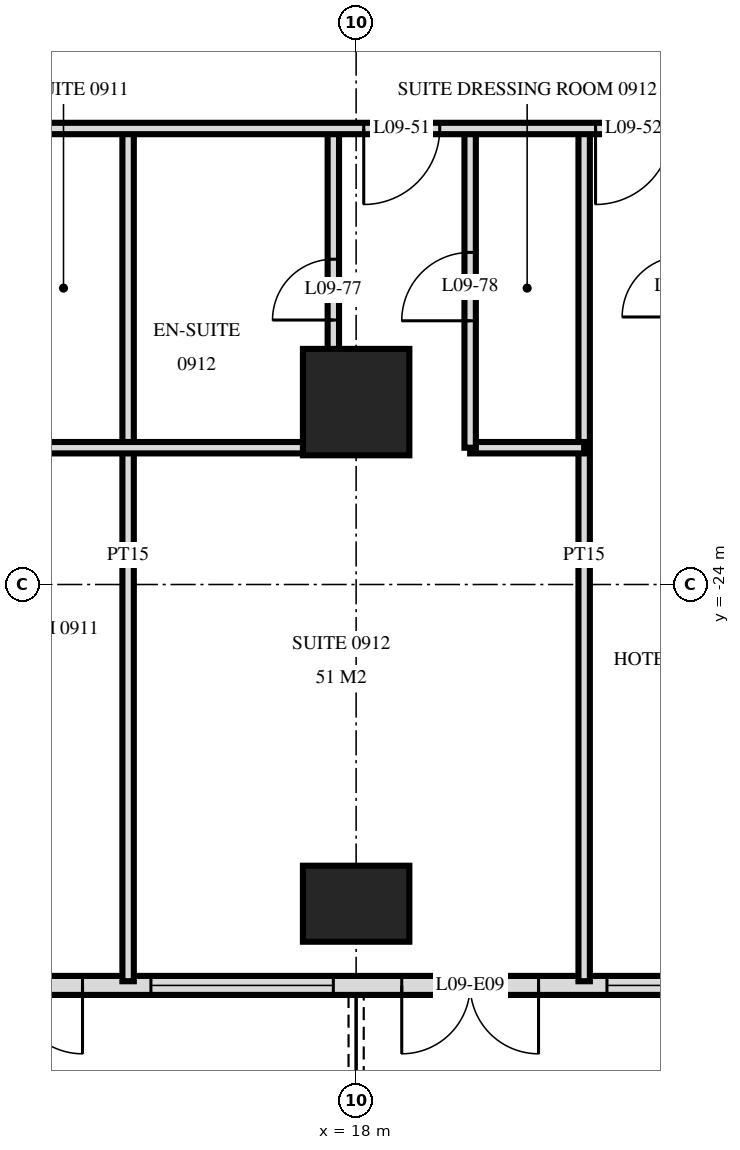
"""IFC4 building model, lengths in metres.
Left out: names, types, materials, properties, quantities, classifications, styles, units other than length and angle.
Written with IfcOpenShell. Run it as: python <this file> out.ifc"""

import sys

from ifc_helpers import new_model, si_unit, direction, frame, frame_2d, origin, origin_2d, place, context, subcontext, project, spatial, rectangle, extrude, element, fill, save


model = new_model("IFC4")
c1 = context("Model", 3, precision=1e-05, world=origin(), true_north=direction((0.0, 1.0)))
c2 = subcontext(c1, "Body", "Model", "MODEL_VIEW")
j1 = project(units=[si_unit("LENGTHUNIT", "METRE"), si_unit("PLANEANGLEUNIT", "RADIAN")], contexts=[c1])
p1 = place(None, origin())
s1 = spatial("IfcSite", under=j1, at=p1, CompositionType="ELEMENT")
p2 = place(p1, origin())
s2 = spatial("IfcBuilding", under=s1, at=p2, CompositionType="ELEMENT")
p3 = place(p2, frame((0.0, 0.0, 42.0)))
s3 = spatial("IfcBuildingStorey", under=s2, at=p3, CompositionType="ELEMENT", Elevation=42.0)
p4 = place(p3, frame((18.0, -28.2, 0.0), z_axis=(0.0, 0.0, 1.0), x_axis=(1.0, 0.0, 0.0)))
e1 = element("IfcColumn", 1, at=p4, inside=s3, PredefinedType="COLUMN", context=c2, shape_type="SweptSolid", body=[
    extrude(rectangle(XDim=1.4, YDim=1.0, at=origin_2d()), origin(), (0.0, 0.0, 1.0), 3.6),
])
p5 = place(p3, frame((18.0, -21.6, 0.0), z_axis=(0.0, 0.0, 1.0), x_axis=(1.0, 0.0, 0.0)))
e2 = element("IfcColumn", 2, at=p5, inside=s3, PredefinedType="COLUMN", context=c2, shape_type="SweptSolid", body=[
    extrude(rectangle(XDim=1.4, YDim=1.4, at=origin_2d()), origin(), (0.0, 0.0, 1.0), 3.6),
])
p6 = place(p3, frame((-28.775, -29.275, 0.0), z_axis=(0.0, 0.0, 1.0), x_axis=(1.0, 0.0, 0.0)))
e3 = element("IfcWall", 3, at=p6, inside=s3, PredefinedType="SOLIDWALL", context=c2, shape_type="SweptSolid", body=[
    extrude(rectangle(XDim=57.551, YDim=0.25, at=frame_2d((28.775, 0.0))), origin(), (0.0, 0.0, 1.0), 3.32),
])
p7 = place(p6, frame((0.575, 0.0, 0.0)))
e4 = element("IfcOpeningElement", 4, at=p7, cuts=e3, PredefinedType="OPENING", context=c2, shape_type="SweptSolid", body=[
    extrude(rectangle(XDim=1.8, YDim=2.4, at=frame_2d((0.9, 1.2))), frame((0.0, 0.135, 0.0), z_axis=(0.0, -1.0, 0.0), x_axis=(1.0, 0.0, 0.0)), (0.0, 0.0, 1.0), 0.27),
])
p8 = place(p6, frame((5.375, 0.0, 0.0)))
e5 = element("IfcOpeningElement", 5, at=p8, cuts=e3, PredefinedType="OPENING", context=c2, shape_type="SweptSolid", body=[
    extrude(rectangle(XDim=1.8, YDim=2.4, at=frame_2d((0.9, 1.2))), frame((0.0, 0.135, 0.0), z_axis=(0.0, -1.0, 0.0), x_axis=(1.0, 0.0, 0.0)), (0.0, 0.0, 1.0), 0.27),
])
p9 = place(p6, frame((8.075, 0.0, 0.3)))
e6 = element("IfcOpeningElement", 6, at=p9, cuts=e3, PredefinedType="OPENING", context=c2, shape_type="SweptSolid", body=[
    extrude(rectangle(XDim=2.4, YDim=2.1, at=frame_2d((1.2, 1.05))), frame((0.0, 0.135, 0.0), z_axis=(0.0, -1.0, 0.0), x_axis=(1.0, 0.0, 0.0)), (0.0, 0.0, 1.0), 0.27),
])
p10 = place(p6, frame((11.375, 0.0, 0.0)))
e7 = element("IfcOpeningElement", 7, at=p10, cuts=e3, PredefinedType="OPENING", context=c2, shape_type="SweptSolid", body=[
    extrude(rectangle(XDim=1.8, YDim=2.4, at=frame_2d((0.9, 1.2))), frame((0.0, 0.135, 0.0), z_axis=(0.0, -1.0, 0.0), x_axis=(1.0, 0.0, 0.0)), (0.0, 0.0, 1.0), 0.27),
])
p11 = place(p6, frame((14.075, 0.0, 0.3)))
e8 = element("IfcOpeningElement", 8, at=p11, cuts=e3, PredefinedType="OPENING", context=c2, shape_type="SweptSolid", body=[
    extrude(rectangle(XDim=2.4, YDim=2.1, at=frame_2d((1.2, 1.05))), frame((0.0, 0.135, 0.0), z_axis=(0.0, -1.0, 0.0), x_axis=(1.0, 0.0, 0.0)), (0.0, 0.0, 1.0), 0.27),
])
p12 = place(p6, frame((17.375, 0.0, 0.0)))
e9 = element("IfcOpeningElement", 9, at=p12, cuts=e3, PredefinedType="OPENING", context=c2, shape_type="SweptSolid", body=[
    extrude(rectangle(XDim=1.8, YDim=2.4, at=frame_2d((0.9, 1.2))), frame((0.0, 0.135, 0.0), z_axis=(0.0, -1.0, 0.0), x_axis=(1.0, 0.0, 0.0)), (0.0, 0.0, 1.0), 0.27),
])
p13 = place(p6, frame((20.075, 0.0, 0.3)))
e10 = element("IfcOpeningElement", 10, at=p13, cuts=e3, PredefinedType="OPENING", context=c2, shape_type="SweptSolid", body=[
    extrude(rectangle(XDim=2.4, YDim=2.1, at=frame_2d((1.2, 1.05))), frame((0.0, 0.135, 0.0), z_axis=(0.0, -1.0, 0.0), x_axis=(1.0, 0.0, 0.0)), (0.0, 0.0, 1.0), 0.27),
])
p14 = place(p6, frame((23.075, 0.0, 0.3)))
e11 = element("IfcOpeningElement", 11, at=p14, cuts=e3, PredefinedType="OPENING", context=c2, shape_type="SweptSolid", body=[
    extrude(rectangle(XDim=2.4, YDim=2.1, at=frame_2d((1.2, 1.05))), frame((0.0, 0.135, 0.0), z_axis=(0.0, -1.0, 0.0), x_axis=(1.0, 0.0, 0.0)), (0.0, 0.0, 1.0), 0.27),
])
p15 = place(p6, frame((26.375, 0.0, 0.0)))
e12 = element("IfcOpeningElement", 12, at=p15, cuts=e3, PredefinedType="OPENING", context=c2, shape_type="SweptSolid", body=[
    extrude(rectangle(XDim=1.8, YDim=2.4, at=frame_2d((0.9, 1.2))), frame((0.0, 0.135, 0.0), z_axis=(0.0, -1.0, 0.0), x_axis=(1.0, 0.0, 0.0)), (0.0, 0.0, 1.0), 0.27),
])
p16 = place(p6, frame((29.375, 0.0, 0.0)))
e13 = element("IfcOpeningElement", 13, at=p16, cuts=e3, PredefinedType="OPENING", context=c2, shape_type="SweptSolid", body=[
    extrude(rectangle(XDim=1.8, YDim=2.4, at=frame_2d((0.9, 1.2))), frame((0.0, 0.135, 0.0), z_axis=(0.0, -1.0, 0.0), x_axis=(1.0, 0.0, 0.0)), (0.0, 0.0, 1.0), 0.27),
])
p17 = place(p6, frame((32.075, 0.0, 0.3)))
e14 = element("IfcOpeningElement", 14, at=p17, cuts=e3, PredefinedType="OPENING", context=c2, shape_type="SweptSolid", body=[
    extrude(rectangle(XDim=2.4, YDim=2.1, at=frame_2d((1.2, 1.05))), frame((0.0, 0.135, 0.0), z_axis=(0.0, -1.0, 0.0), x_axis=(1.0, 0.0, 0.0)), (0.0, 0.0, 1.0), 0.27),
])
p18 = place(p6, frame((35.375, 0.0, 0.0)))
e15 = element("IfcOpeningElement", 15, at=p18, cuts=e3, PredefinedType="OPENING", context=c2, shape_type="SweptSolid", body=[
    extrude(rectangle(XDim=1.8, YDim=2.4, at=frame_2d((0.9, 1.2))), frame((0.0, 0.135, 0.0), z_axis=(0.0, -1.0, 0.0), x_axis=(1.0, 0.0, 0.0)), (0.0, 0.0, 1.0), 0.27),
])
p19 = place(p6, frame((38.075, 0.0, 0.3)))
e16 = element("IfcOpeningElement", 16, at=p19, cuts=e3, PredefinedType="OPENING", context=c2, shape_type="SweptSolid", body=[
    extrude(rectangle(XDim=2.4, YDim=2.1, at=frame_2d((1.2, 1.05))), frame((0.0, 0.135, 0.0), z_axis=(0.0, -1.0, 0.0), x_axis=(1.0, 0.0, 0.0)), (0.0, 0.0, 1.0), 0.27),
])
p20 = place(p6, frame((41.375, 0.0, 0.0)))
e17 = element("IfcOpeningElement", 17, at=p20, cuts=e3, PredefinedType="OPENING", context=c2, shape_type="SweptSolid", body=[
    extrude(rectangle(XDim=1.8, YDim=2.4, at=frame_2d((0.9, 1.2))), frame((0.0, 0.135, 0.0), z_axis=(0.0, -1.0, 0.0), x_axis=(1.0, 0.0, 0.0)), (0.0, 0.0, 1.0), 0.27),
])
p21 = place(p6, frame((44.075, 0.0, 0.3)))
e18 = element("IfcOpeningElement", 18, at=p21, cuts=e3, PredefinedType="OPENING", context=c2, shape_type="SweptSolid", body=[
    extrude(rectangle(XDim=2.4, YDim=2.1, at=frame_2d((1.2, 1.05))), frame((0.0, 0.135, 0.0), z_axis=(0.0, -1.0, 0.0), x_axis=(1.0, 0.0, 0.0)), (0.0, 0.0, 1.0), 0.27),
])
p22 = place(p6, frame((47.375, 0.0, 0.0)))
e19 = element("IfcOpeningElement", 19, at=p22, cuts=e3, PredefinedType="OPENING", context=c2, shape_type="SweptSolid", body=[
    extrude(rectangle(XDim=1.8, YDim=2.4, at=frame_2d((0.9, 1.2))), frame((0.0, 0.135, 0.0), z_axis=(0.0, -1.0, 0.0), x_axis=(1.0, 0.0, 0.0)), (0.0, 0.0, 1.0), 0.27),
])
p23 = place(p6, frame((50.075, 0.0, 0.3)))
e20 = element("IfcOpeningElement", 20, at=p23, cuts=e3, PredefinedType="OPENING", context=c2, shape_type="SweptSolid", body=[
    extrude(rectangle(XDim=2.4, YDim=2.1, at=frame_2d((1.2, 1.05))), frame((0.0, 0.135, 0.0), z_axis=(0.0, -1.0, 0.0), x_axis=(1.0, 0.0, 0.0)), (0.0, 0.0, 1.0), 0.27),
])
p24 = place(p6, frame((53.375, 0.0, 0.0)))
e21 = element("IfcOpeningElement", 21, at=p24, cuts=e3, PredefinedType="OPENING", context=c2, shape_type="SweptSolid", body=[
    extrude(rectangle(XDim=1.8, YDim=2.4, at=frame_2d((0.9, 1.2))), frame((0.0, 0.135, 0.0), z_axis=(0.0, -1.0, 0.0), x_axis=(1.0, 0.0, 0.0)), (0.0, 0.0, 1.0), 0.27),
])
p25 = place(p3, frame((21.0, -29.22, 0.0), z_axis=(0.0, 0.0, 1.0), x_axis=(0.0, 1.0, 0.0)))
e22 = element("IfcWall", 22, at=p25, inside=s3, PredefinedType="PARTITIONING", context=c2, shape_type="SweptSolid", body=[
    extrude(rectangle(XDim=11.22, YDim=0.15, at=frame_2d((5.61, 0.0))), origin(), (0.0, 0.0, 1.0), 3.32),
])
p26 = place(p3, frame((19.5, -22.2, 0.0), z_axis=(0.0, 0.0, 1.0), x_axis=(0.0, 1.0, 0.0)))
e23 = element("IfcWall", 23, at=p26, inside=s3, PredefinedType="PARTITIONING", context=c2, shape_type="SweptSolid", body=[
    extrude(rectangle(XDim=4.2, YDim=0.15, at=frame_2d((2.1, 0.0))), origin(), (0.0, 0.0, 1.0), 3.32),
])
p27 = place(p26, frame((1.67, 0.0, 0.0)))
e24 = element("IfcOpeningElement", 24, at=p27, cuts=e23, PredefinedType="OPENING", context=c2, shape_type="SweptSolid", body=[
    extrude(rectangle(XDim=0.9, YDim=2.1, at=frame_2d((0.45, 1.05))), frame((0.0, 0.085, 0.0), z_axis=(0.0, -1.0, 0.0), x_axis=(1.0, 0.0, 0.0)), (0.0, 0.0, 1.0), 0.17),
])
p28 = place(p3, frame((17.7, -22.2, 0.0), z_axis=(0.0, 0.0, 1.0), x_axis=(0.0, 1.0, 0.0)))
e25 = element("IfcWall", 25, at=p28, inside=s3, PredefinedType="PARTITIONING", context=c2, shape_type="SweptSolid", body=[
    extrude(rectangle(XDim=4.2, YDim=0.15, at=frame_2d((2.1, 0.0))), origin(), (0.0, 0.0, 1.0), 3.32),
])
p29 = place(p28, frame((1.68, 0.0, 0.0)))
e26 = element("IfcOpeningElement", 26, at=p29, cuts=e25, PredefinedType="OPENING", context=c2, shape_type="SweptSolid", body=[
    extrude(rectangle(XDim=0.8, YDim=2.1, at=frame_2d((0.4, 1.05))), frame((0.0, 0.085, 0.0), z_axis=(0.0, -1.0, 0.0), x_axis=(1.0, 0.0, 0.0)), (0.0, 0.0, 1.0), 0.17),
])
p30 = place(p3, frame((15.0, -29.22, 0.0), z_axis=(0.0, 0.0, 1.0), x_axis=(0.0, 1.0, 0.0)))
e27 = element("IfcWall", 27, at=p30, inside=s3, PredefinedType="PARTITIONING", context=c2, shape_type="SweptSolid", body=[
    extrude(rectangle(XDim=11.22, YDim=0.15, at=frame_2d((5.61, 0.0))), origin(), (0.0, 0.0, 1.0), 3.32),
])
p31 = place(p3, frame((13.3, -22.2, 0.0), z_axis=(0.0, 0.0, 1.0), x_axis=(1.0, 0.0, 0.0)))
e28 = element("IfcWall", 28, at=p31, inside=s3, PredefinedType="PARTITIONING", context=c2, shape_type="SweptSolid", body=[
    extrude(rectangle(XDim=4.4, YDim=0.15, at=frame_2d((2.2, 0.0))), origin(), (0.0, 0.0, 1.0), 3.32),
])
p32 = place(p3, frame((19.5, -22.2, 0.0), z_axis=(0.0, 0.0, 1.0), x_axis=(1.0, 0.0, 0.0)))
e29 = element("IfcWall", 29, at=p32, inside=s3, PredefinedType="PARTITIONING", context=c2, shape_type="SweptSolid", body=[
    extrude(rectangle(XDim=1.5, YDim=0.15, at=frame_2d((0.75, 0.0))), origin(), (0.0, 0.0, 1.0), 3.32),
])
p33 = place(p3, frame((-33.12, -18.0, 0.0), z_axis=(0.0, 0.0, 1.0), x_axis=(1.0, 0.0, 0.0)))
e30 = element("IfcWall", 30, at=p33, inside=s3, PredefinedType="PARTITIONING", context=c2, shape_type="SweptSolid", body=[
    extrude(rectangle(XDim=66.24, YDim=0.15, at=frame_2d((33.12, 0.0))), origin(), (0.0, 0.0, 1.0), 3.32),
])
p34 = place(p33, frame((12.27, 0.0, 0.0)))
e31 = element("IfcOpeningElement", 31, at=p34, cuts=e30, PredefinedType="OPENING", context=c2, shape_type="SweptSolid", body=[
    extrude(rectangle(XDim=1.0, YDim=2.1, at=frame_2d((0.5, 1.05))), frame((0.0, 0.085, 0.0), z_axis=(0.0, -1.0, 0.0), x_axis=(1.0, 0.0, 0.0)), (0.0, 0.0, 1.0), 0.17),
])
p35 = place(p33, frame((16.97, 0.0, 0.0)))
e32 = element("IfcOpeningElement", 32, at=p35, cuts=e30, PredefinedType="OPENING", context=c2, shape_type="SweptSolid", body=[
    extrude(rectangle(XDim=1.0, YDim=2.1, at=frame_2d((0.5, 1.05))), frame((0.0, 0.085, 0.0), z_axis=(0.0, -1.0, 0.0), x_axis=(1.0, 0.0, 0.0)), (0.0, 0.0, 1.0), 0.17),
])
p36 = place(p33, frame((18.27, 0.0, 0.0)))
e33 = element("IfcOpeningElement", 33, at=p36, cuts=e30, PredefinedType="OPENING", context=c2, shape_type="SweptSolid", body=[
    extrude(rectangle(XDim=1.0, YDim=2.1, at=frame_2d((0.5, 1.05))), frame((0.0, 0.085, 0.0), z_axis=(0.0, -1.0, 0.0), x_axis=(1.0, 0.0, 0.0)), (0.0, 0.0, 1.0), 0.17),
])
p37 = place(p33, frame((22.97, 0.0, 0.0)))
e34 = element("IfcOpeningElement", 34, at=p37, cuts=e30, PredefinedType="OPENING", context=c2, shape_type="SweptSolid", body=[
    extrude(rectangle(XDim=1.0, YDim=2.1, at=frame_2d((0.5, 1.05))), frame((0.0, 0.085, 0.0), z_axis=(0.0, -1.0, 0.0), x_axis=(1.0, 0.0, 0.0)), (0.0, 0.0, 1.0), 0.17),
])
p38 = place(p33, frame((24.27, 0.0, 0.0)))
e35 = element("IfcOpeningElement", 35, at=p38, cuts=e30, PredefinedType="OPENING", context=c2, shape_type="SweptSolid", body=[
    extrude(rectangle(XDim=1.0, YDim=2.1, at=frame_2d((0.5, 1.05))), frame((0.0, 0.085, 0.0), z_axis=(0.0, -1.0, 0.0), x_axis=(1.0, 0.0, 0.0)), (0.0, 0.0, 1.0), 0.17),
])
p39 = place(p33, frame((28.97, 0.0, 0.0)))
e36 = element("IfcOpeningElement", 36, at=p39, cuts=e30, PredefinedType="OPENING", context=c2, shape_type="SweptSolid", body=[
    extrude(rectangle(XDim=1.0, YDim=2.1, at=frame_2d((0.5, 1.05))), frame((0.0, 0.085, 0.0), z_axis=(0.0, -1.0, 0.0), x_axis=(1.0, 0.0, 0.0)), (0.0, 0.0, 1.0), 0.17),
])
p40 = place(p33, frame((30.27, 0.0, 0.0)))
e37 = element("IfcOpeningElement", 37, at=p40, cuts=e30, PredefinedType="OPENING", context=c2, shape_type="SweptSolid", body=[
    extrude(rectangle(XDim=1.0, YDim=2.1, at=frame_2d((0.5, 1.05))), frame((0.0, 0.085, 0.0), z_axis=(0.0, -1.0, 0.0), x_axis=(1.0, 0.0, 0.0)), (0.0, 0.0, 1.0), 0.17),
])
p41 = place(p33, frame((34.97, 0.0, 0.0)))
e38 = element("IfcOpeningElement", 38, at=p41, cuts=e30, PredefinedType="OPENING", context=c2, shape_type="SweptSolid", body=[
    extrude(rectangle(XDim=1.0, YDim=2.1, at=frame_2d((0.5, 1.05))), frame((0.0, 0.085, 0.0), z_axis=(0.0, -1.0, 0.0), x_axis=(1.0, 0.0, 0.0)), (0.0, 0.0, 1.0), 0.17),
])
p42 = place(p33, frame((37.27, 0.0, 0.0)))
e39 = element("IfcOpeningElement", 39, at=p42, cuts=e30, PredefinedType="OPENING", context=c2, shape_type="SweptSolid", body=[
    extrude(rectangle(XDim=1.0, YDim=2.1, at=frame_2d((0.5, 1.05))), frame((0.0, 0.085, 0.0), z_axis=(0.0, -1.0, 0.0), x_axis=(1.0, 0.0, 0.0)), (0.0, 0.0, 1.0), 0.17),
])
p43 = place(p33, frame((43.97, 0.0, 0.0)))
e40 = element("IfcOpeningElement", 40, at=p43, cuts=e30, PredefinedType="OPENING", context=c2, shape_type="SweptSolid", body=[
    extrude(rectangle(XDim=1.0, YDim=2.1, at=frame_2d((0.5, 1.05))), frame((0.0, 0.085, 0.0), z_axis=(0.0, -1.0, 0.0), x_axis=(1.0, 0.0, 0.0)), (0.0, 0.0, 1.0), 0.17),
])
p44 = place(p33, frame((45.27, 0.0, 0.0)))
e41 = element("IfcOpeningElement", 41, at=p44, cuts=e30, PredefinedType="OPENING", context=c2, shape_type="SweptSolid", body=[
    extrude(rectangle(XDim=1.0, YDim=2.1, at=frame_2d((0.5, 1.05))), frame((0.0, 0.085, 0.0), z_axis=(0.0, -1.0, 0.0), x_axis=(1.0, 0.0, 0.0)), (0.0, 0.0, 1.0), 0.17),
])
p45 = place(p33, frame((51.22, 0.0, 0.0)))
e42 = element("IfcOpeningElement", 42, at=p45, cuts=e30, PredefinedType="OPENING", context=c2, shape_type="SweptSolid", body=[
    extrude(rectangle(XDim=1.0, YDim=2.1, at=frame_2d((0.5, 1.05))), frame((0.0, 0.085, 0.0), z_axis=(0.0, -1.0, 0.0), x_axis=(1.0, 0.0, 0.0)), (0.0, 0.0, 1.0), 0.17),
])
p46 = place(p33, frame((54.27, 0.0, 0.0)))
e43 = element("IfcOpeningElement", 43, at=p46, cuts=e30, PredefinedType="OPENING", context=c2, shape_type="SweptSolid", body=[
    extrude(rectangle(XDim=1.0, YDim=2.1, at=frame_2d((0.5, 1.05))), frame((0.0, 0.085, 0.0), z_axis=(0.0, -1.0, 0.0), x_axis=(1.0, 0.0, 0.0)), (0.0, 0.0, 1.0), 0.17),
])
p47 = place(p33, frame((6.07, 0.0, 0.0)))
e44 = element("IfcOpeningElement", 44, at=p47, cuts=e30, PredefinedType="OPENING", context=c2, shape_type="SweptSolid", body=[
    extrude(rectangle(XDim=1.0, YDim=2.1, at=frame_2d((0.5, 1.05))), frame((0.0, 0.085, 0.0), z_axis=(0.0, -1.0, 0.0), x_axis=(1.0, 0.0, 0.0)), (0.0, 0.0, 1.0), 0.17),
])
p48 = place(p33, frame((63.37, 0.0, 0.0)))
e45 = element("IfcOpeningElement", 45, at=p48, cuts=e30, PredefinedType="OPENING", context=c2, shape_type="SweptSolid", body=[
    extrude(rectangle(XDim=1.0, YDim=2.1, at=frame_2d((0.5, 1.05))), frame((0.0, 0.085, 0.0), z_axis=(0.0, -1.0, 0.0), x_axis=(1.0, 0.0, 0.0)), (0.0, 0.0, 1.0), 0.17),
])
p49 = place(p20, frame((0.9, 0.0, 0.0), z_axis=(0.0, 0.0, 1.0), x_axis=(-1.0, 0.0, 0.0)))
e46 = element("IfcDoor", 46, at=p49, inside=s3, OperationType="DOUBLE_DOOR_SINGLE_SWING", PredefinedType="DOOR", context=c2, shape_type="SweptSolid", body=[
    extrude(rectangle(XDim=1.8, YDim=2.4, at=frame_2d((0.0, 1.2))), frame((0.0, -0.025, 0.0), z_axis=(0.0, 1.0, 0.0), x_axis=(-1.0, 0.0, 0.0)), (0.0, 0.0, 1.0), 0.05),
])
fill(e17, e46)
p50 = place(p21, origin())
e47 = element("IfcWindow", 47, at=p50, inside=s3, PartitioningType="SINGLE_PANEL", PredefinedType="WINDOW", context=c2, shape_type="SweptSolid", body=[
    extrude(rectangle(XDim=2.4, YDim=2.1, at=frame_2d((1.2, 1.05))), frame((0.0, 0.03, 0.0), z_axis=(0.0, -1.0, 0.0), x_axis=(1.0, 0.0, 0.0)), (0.0, 0.0, 1.0), 0.06),
])
fill(e18, e47)
p51 = place(p22, frame((0.9, 0.0, 0.0), z_axis=(0.0, 0.0, 1.0), x_axis=(-1.0, 0.0, 0.0)))
e48 = element("IfcDoor", 48, at=p51, inside=s3, OperationType="DOUBLE_DOOR_SINGLE_SWING", PredefinedType="DOOR", context=c2, shape_type="SweptSolid", body=[
    extrude(rectangle(XDim=1.8, YDim=2.4, at=frame_2d((0.0, 1.2))), frame((0.0, -0.025, 0.0), z_axis=(0.0, 1.0, 0.0), x_axis=(-1.0, 0.0, 0.0)), (0.0, 0.0, 1.0), 0.05),
])
fill(e19, e48)
p52 = place(p23, origin())
e49 = element("IfcWindow", 49, at=p52, inside=s3, PartitioningType="SINGLE_PANEL", PredefinedType="WINDOW", context=c2, shape_type="SweptSolid", body=[
    extrude(rectangle(XDim=2.4, YDim=2.1, at=frame_2d((1.2, 1.05))), frame((0.0, 0.03, 0.0), z_axis=(0.0, -1.0, 0.0), x_axis=(1.0, 0.0, 0.0)), (0.0, 0.0, 1.0), 0.06),
])
fill(e20, e49)
p53 = place(p45, frame((0.5, 0.0, 0.0), z_axis=(0.0, 0.0, 1.0), x_axis=(-1.0, 0.0, 0.0)))
e50 = element("IfcDoor", 50, at=p53, inside=s3, OperationType="SINGLE_SWING_LEFT", PredefinedType="DOOR", context=c2, shape_type="SweptSolid", body=[
    extrude(rectangle(XDim=1.0, YDim=2.1, at=frame_2d((0.0, 1.05))), frame((0.0, -0.025, 0.0), z_axis=(0.0, 1.0, 0.0), x_axis=(-1.0, 0.0, 0.0)), (0.0, 0.0, 1.0), 0.05),
])
fill(e42, e50)
p54 = place(p46, frame((0.5, 0.0, 0.0), z_axis=(0.0, 0.0, 1.0), x_axis=(-1.0, 0.0, 0.0)))
e51 = element("IfcDoor", 51, at=p54, inside=s3, OperationType="SINGLE_SWING_LEFT", PredefinedType="DOOR", context=c2, shape_type="SweptSolid", body=[
    extrude(rectangle(XDim=1.0, YDim=2.1, at=frame_2d((0.0, 1.05))), frame((0.0, -0.025, 0.0), z_axis=(0.0, 1.0, 0.0), x_axis=(-1.0, 0.0, 0.0)), (0.0, 0.0, 1.0), 0.05),
])
fill(e43, e51)
p55 = place(p29, origin())
e52 = element("IfcDoor", 52, at=p55, inside=s3, OperationType="SINGLE_SWING_RIGHT", PredefinedType="DOOR", context=c2, shape_type="SweptSolid", body=[
    extrude(rectangle(XDim=0.8, YDim=2.1, at=frame_2d((0.4, 1.05))), frame((0.0, 0.025, 0.0), z_axis=(0.0, -1.0, 0.0), x_axis=(1.0, 0.0, 0.0)), (0.0, 0.0, 1.0), 0.05),
])
fill(e26, e52)
p56 = place(p27, origin())
e53 = element("IfcDoor", 53, at=p56, inside=s3, OperationType="SINGLE_SWING_RIGHT", PredefinedType="DOOR", context=c2, shape_type="SweptSolid", body=[
    extrude(rectangle(XDim=0.9, YDim=2.1, at=frame_2d((0.45, 1.05))), frame((0.0, 0.025, 0.0), z_axis=(0.0, -1.0, 0.0), x_axis=(1.0, 0.0, 0.0)), (0.0, 0.0, 1.0), 0.05),
])
fill(e24, e53)
save(model, sys.argv[1])
